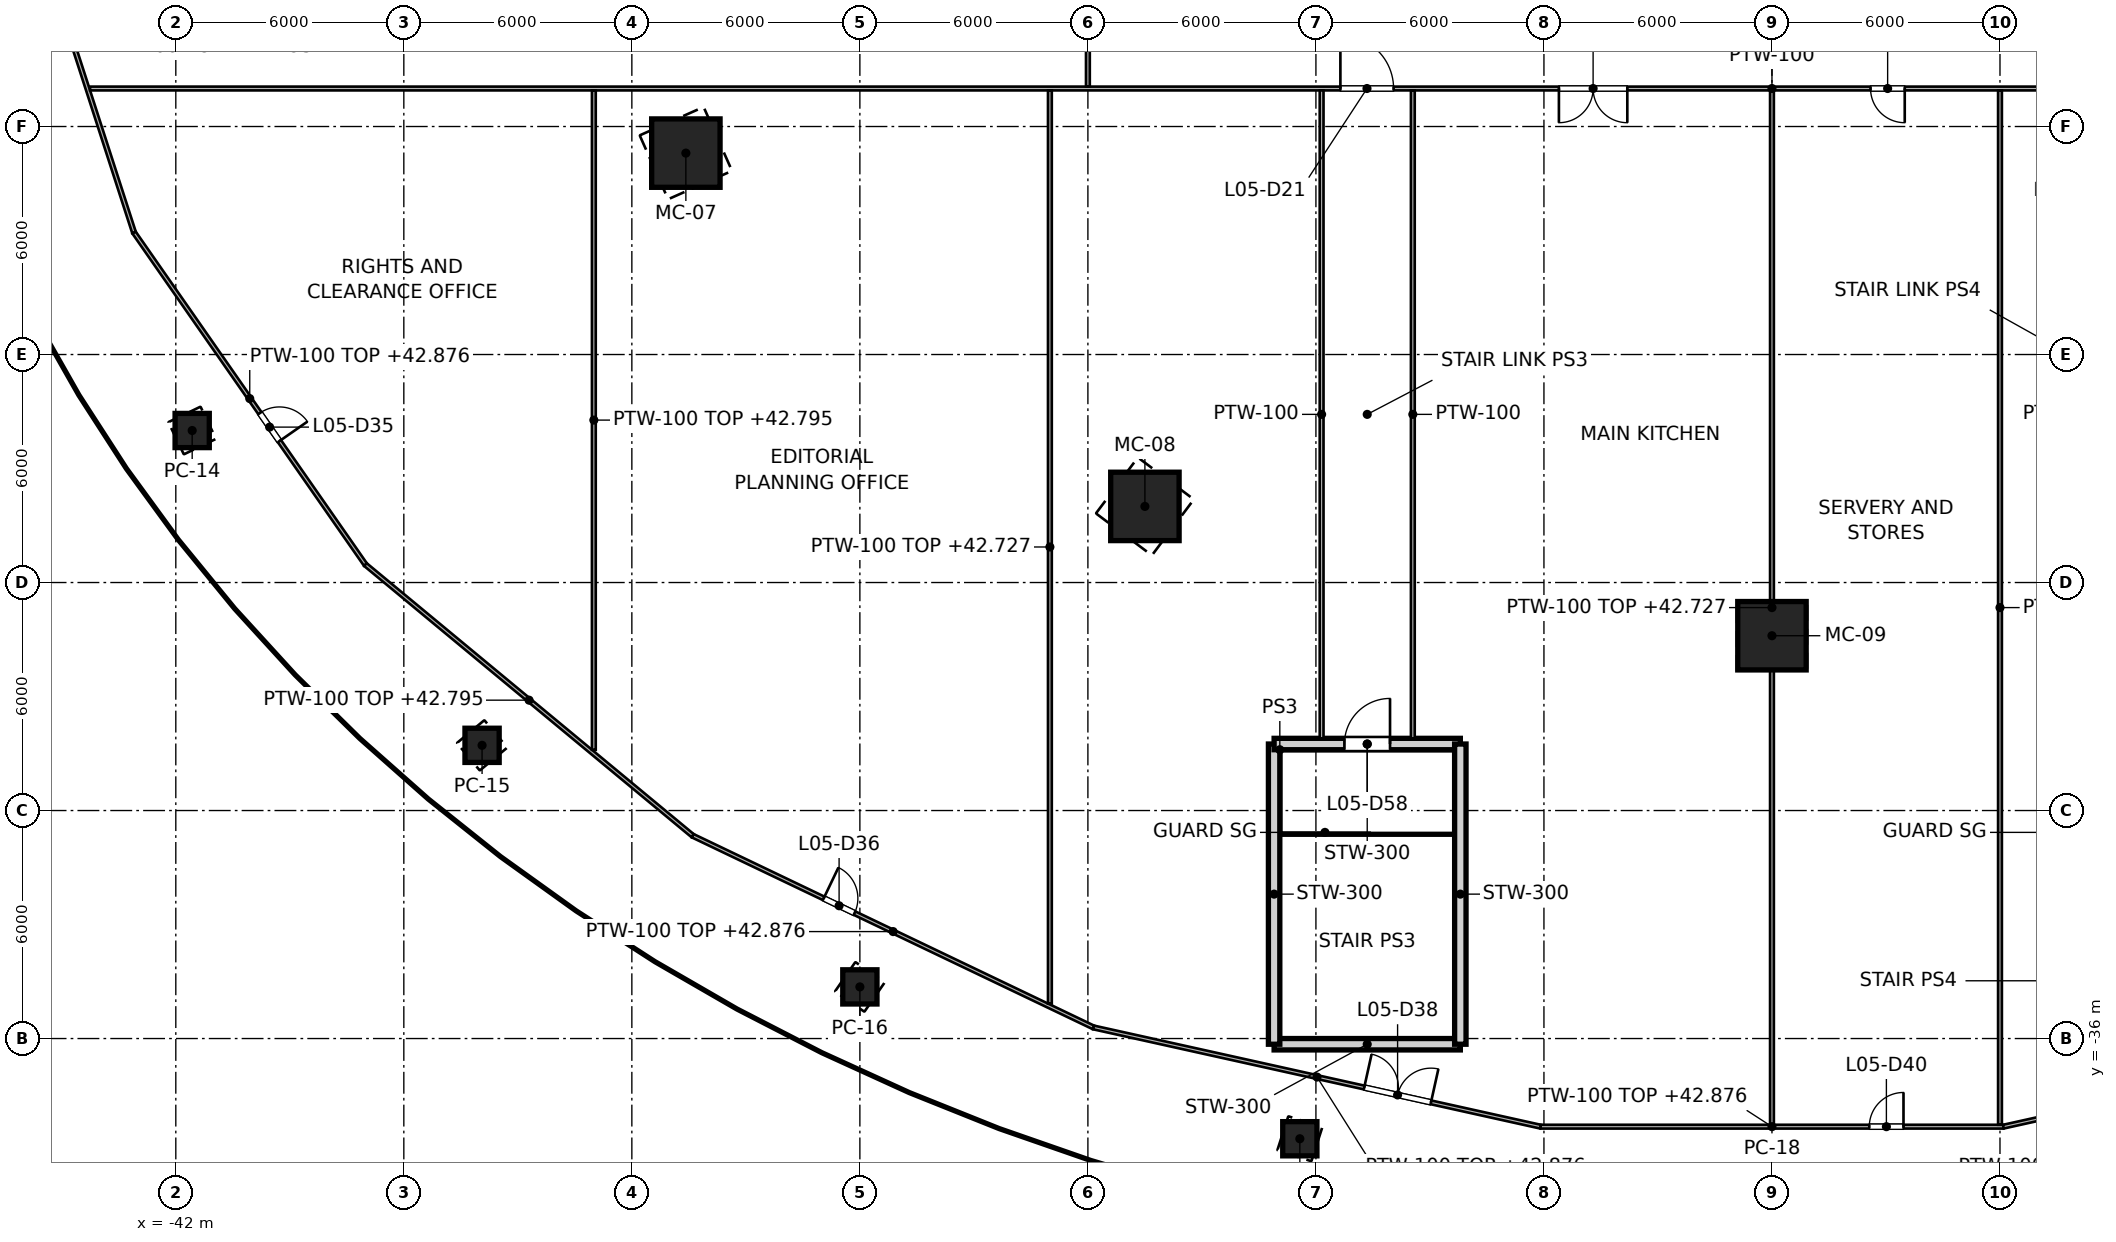
"""IFC4 building model, lengths in metres.
Left out: names, types, materials, properties, quantities, classifications, styles, units other than length and angle.
Written with IfcOpenShell. Run it as: python <this file> out.ifc"""

import sys

from ifc_helpers import new_model, si_unit, direction, frame, frame_2d, origin, origin_2d, place, context, subcontext, project, spatial, rectangle, hollow_rectangle, extrude, element, fill, save


model = new_model("IFC4")
c1 = context("Model", 3, precision=1e-05, world=origin(), true_north=direction((0.0, 1.0)))
c2 = subcontext(c1, "Body", "Model", "MODEL_VIEW")
j1 = project(units=[si_unit("LENGTHUNIT", "METRE"), si_unit("PLANEANGLEUNIT", "RADIAN")], contexts=[c1])
p1 = place(None, origin())
s1 = spatial("IfcSite", under=j1, at=p1, CompositionType="ELEMENT")
p2 = place(p1, origin())
s2 = spatial("IfcBuilding", under=s1, at=p2, CompositionType="ELEMENT")
p3 = place(p2, frame((0.0, 0.0, 37.4)))
s3 = spatial("IfcBuildingStorey", under=s2, at=p3, CompositionType="ELEMENT", Elevation=37.4)
for number, where, z_axis, x_axis in (
    (1, (-28.579, -12.7, 0.0), (0.0, 0.0, 1.0), (-0.914, -0.406, 0.0)),
    (2, (-16.5, -21.997, 0.0), (0.0, 0.0, 1.0), (-0.6, -0.8, 0.0)),
    (3, (0.0, -25.4, 0.0), (0.0, 0.0, 1.0), (0.0, -1.0, 0.0)),
):
    element("IfcColumn", number, at=place(p3, frame(where, z_axis=z_axis, x_axis=x_axis)), inside=s3, PredefinedType="COLUMN", context=c2, shape_type="SweptSolid", body=[
        extrude(hollow_rectangle(XDim=1.8, YDim=1.8, WallThickness=0.08, at=origin_2d()), origin(), (0.0, 0.0, 1.0), 5.9),
    ])
for number, where, z_axis, x_axis in (
    (4, (-41.569, -20.0, 0.0), (0.0, 0.0, 1.0), (-0.901, -0.434, 0.0)),
    (5, (-33.941, -28.284, 0.0), (0.0, 0.0, 1.0), (-0.768, -0.64, 0.0)),
    (6, (-24.0, -34.641, 0.0), (0.0, 0.0, 1.0), (-0.569, -0.822, 0.0)),
    (7, (-12.423, -38.637, 0.0), (0.0, 0.0, 1.0), (-0.306, -0.952, 0.0)),
):
    element("IfcColumn", number, at=place(p3, frame(where, z_axis=z_axis, x_axis=x_axis)), inside=s3, PredefinedType="COLUMN", context=c2, shape_type="SweptSolid", body=[
        extrude(hollow_rectangle(XDim=0.9, YDim=0.9, WallThickness=0.04, at=origin_2d()), origin(), (0.0, 0.0, 1.0), 6.6),
    ])
p4 = place(p3, frame((-8.2, -36.15, 0.0), z_axis=(0.0, 0.0, 1.0), x_axis=(-1.0, 0.0, 0.0)))
e8 = element("IfcWall", 8, at=p4, inside=s3, PredefinedType="SOLIDWALL", context=c2, shape_type="SweptSolid", body=[
    extrude(rectangle(XDim=4.9, YDim=0.3, at=frame_2d((2.45, 0.0))), origin(), (0.0, 0.0, 1.0), 6.25),
])
p5 = place(p3, frame((-13.1, -36.15, 0.0), z_axis=(0.0, 0.0, 1.0), x_axis=(0.0, 1.0, 0.0)))
e9 = element("IfcWall", 9, at=p5, inside=s3, PredefinedType="SOLIDWALL", context=c2, shape_type="SweptSolid", body=[
    extrude(rectangle(XDim=7.9, YDim=0.3, at=frame_2d((3.95, 0.0))), origin(), (0.0, 0.0, 1.0), 6.25),
])
p6 = place(p3, frame((-13.1, -28.25, 0.0), z_axis=(0.0, 0.0, 1.0), x_axis=(1.0, 0.0, 0.0)))
e10 = element("IfcWall", 10, at=p6, inside=s3, PredefinedType="SOLIDWALL", context=c2, shape_type="SweptSolid", body=[
    extrude(rectangle(XDim=4.9, YDim=0.3, at=frame_2d((2.45, 0.0))), origin(), (0.0, 0.0, 1.0), 6.25),
])
p7 = place(p6, frame((1.85, 0.0, 0.0)))
e11 = element("IfcOpeningElement", 11, at=p7, cuts=e10, PredefinedType="OPENING", context=c2, shape_type="SweptSolid", body=[
    extrude(rectangle(XDim=1.2, YDim=2.1, at=frame_2d((0.6, 1.05))), frame((0.0, 0.15, 0.0), z_axis=(0.0, -1.0, 0.0), x_axis=(1.0, 0.0, 0.0)), (0.0, 0.0, 1.0), 0.3),
])
p8 = place(p3, frame((-8.2, -28.25, 0.0), z_axis=(0.0, 0.0, 1.0), x_axis=(0.0, -1.0, 0.0)))
e12 = element("IfcWall", 12, at=p8, inside=s3, PredefinedType="SOLIDWALL", context=c2, shape_type="SweptSolid", body=[
    extrude(rectangle(XDim=7.9, YDim=0.3, at=frame_2d((3.95, 0.0))), origin(), (0.0, 0.0, 1.0), 6.25),
])
p9 = place(p3, frame((-46.251, -5.045, 0.0), z_axis=(0.0, 0.0, 1.0), x_axis=(0.307713034182, -0.951479210805, 0.0)))
e13 = element("IfcWall", 13, at=p9, inside=s3, PredefinedType="PARTITIONING", context=c2, shape_type="SweptSolid", body=[
    extrude(rectangle(XDim=10.243, YDim=0.1, at=frame_2d((5.122, 0.0))), origin(), (0.0, 0.0, 1.0), 5.395),
])
p10 = place(p3, frame((-43.099, -14.791, 0.0), z_axis=(0.0, 0.0, 1.0), x_axis=(0.571737958261, -0.820436290692, 0.0)))
e14 = element("IfcWall", 14, at=p10, inside=s3, PredefinedType="PARTITIONING", context=c2, shape_type="SweptSolid", body=[
    extrude(rectangle(XDim=10.65, YDim=0.1, at=frame_2d((5.325, 0.0))), origin(), (0.0, 0.0, 1.0), 5.476),
])
p11 = place(p10, frame((5.79, 0.0, 0.0)))
e15 = element("IfcOpeningElement", 15, at=p11, cuts=e14, PredefinedType="OPENING", context=c2, shape_type="SweptSolid", body=[
    extrude(rectangle(XDim=0.9, YDim=2.1, at=frame_2d((0.45, 1.05))), frame((0.0, 0.05, 0.0), z_axis=(0.0, -1.0, 0.0), x_axis=(1.0, 0.0, 0.0)), (0.0, 0.0, 1.0), 0.1),
])
p12 = place(p3, frame((-37.01, -23.529, 0.0), z_axis=(0.0, 0.0, 1.0), x_axis=(0.770046995363, -0.637987166746, 0.0)))
e16 = element("IfcWall", 16, at=p12, inside=s3, PredefinedType="PARTITIONING", context=c2, shape_type="SweptSolid", body=[
    extrude(rectangle(XDim=11.183, YDim=0.1, at=frame_2d((5.591, 0.0))), origin(), (0.0, 0.0, 1.0), 5.395),
])
p13 = place(p3, frame((-28.399, -30.663, 0.0), z_axis=(0.0, 0.0, 1.0), x_axis=(0.902100999032, -0.431524955878, 0.0)))
e17 = element("IfcWall", 17, at=p13, inside=s3, PredefinedType="PARTITIONING", context=c2, shape_type="SweptSolid", body=[
    extrude(rectangle(XDim=11.691, YDim=0.1, at=frame_2d((5.845, 0.0))), origin(), (0.0, 0.0, 1.0), 5.476),
])
p14 = place(p13, frame((3.82, 0.0, 0.0)))
e18 = element("IfcOpeningElement", 18, at=p14, cuts=e17, PredefinedType="OPENING", context=c2, shape_type="SweptSolid", body=[
    extrude(rectangle(XDim=0.9, YDim=2.1, at=frame_2d((0.45, 1.05))), frame((0.0, 0.05, 0.0), z_axis=(0.0, -1.0, 0.0), x_axis=(1.0, 0.0, 0.0)), (0.0, 0.0, 1.0), 0.1),
])
p15 = place(p3, frame((-17.852, -35.708, 0.0), z_axis=(0.0, 0.0, 1.0), x_axis=(0.97623471049, -0.216715920124, 0.0)))
e19 = element("IfcWall", 19, at=p15, inside=s3, PredefinedType="PARTITIONING", context=c2, shape_type="SweptSolid", body=[
    extrude(rectangle(XDim=12.05, YDim=0.1, at=frame_2d((6.025, 0.0))), origin(), (0.0, 0.0, 1.0), 5.476),
])
p16 = place(p15, frame((7.296, 0.0, 0.0)))
e20 = element("IfcOpeningElement", 20, at=p16, cuts=e19, PredefinedType="OPENING", context=c2, shape_type="SweptSolid", body=[
    extrude(rectangle(XDim=1.8, YDim=2.1, at=frame_2d((0.9, 1.05))), frame((0.0, 0.05, 0.0), z_axis=(0.0, -1.0, 0.0), x_axis=(1.0, 0.0, 0.0)), (0.0, 0.0, 1.0), 0.1),
])
p17 = place(p3, frame((-6.089, -38.319, 0.0), z_axis=(0.0, 0.0, 1.0), x_axis=(1.0, 0.0, 0.0)))
e21 = element("IfcWall", 21, at=p17, inside=s3, PredefinedType="PARTITIONING", context=c2, shape_type="SweptSolid", body=[
    extrude(rectangle(XDim=12.178, YDim=0.1, at=frame_2d((6.089, 0.0))), origin(), (0.0, 0.0, 1.0), 5.476),
])
p18 = place(p17, frame((8.65, 0.0, 0.0)))
e22 = element("IfcOpeningElement", 22, at=p18, cuts=e21, PredefinedType="OPENING", context=c2, shape_type="SweptSolid", body=[
    extrude(rectangle(XDim=0.9, YDim=2.1, at=frame_2d((0.45, 1.05))), frame((0.0, 0.05, 0.0), z_axis=(0.0, -1.0, 0.0), x_axis=(1.0, 0.0, 0.0)), (0.0, 0.0, 1.0), 0.1),
])
p19 = place(p3, frame((6.089, -38.319, 0.0), z_axis=(0.0, 0.0, 1.0), x_axis=(0.97623471049, 0.216715920124, 0.0)))
e23 = element("IfcWall", 23, at=p19, inside=s3, PredefinedType="PARTITIONING", context=c2, shape_type="SweptSolid", body=[
    extrude(rectangle(XDim=12.05, YDim=0.1, at=frame_2d((6.025, 0.0))), origin(), (0.0, 0.0, 1.0), 5.476),
])
p20 = place(p19, frame((3.0, 0.0, 0.0)))
e24 = element("IfcOpeningElement", 24, at=p20, cuts=e23, PredefinedType="OPENING", context=c2, shape_type="SweptSolid", body=[
    extrude(rectangle(XDim=1.8, YDim=2.1, at=frame_2d((0.9, 1.05))), frame((0.0, 0.05, 0.0), z_axis=(0.0, -1.0, 0.0), x_axis=(1.0, 0.0, 0.0)), (0.0, 0.0, 1.0), 0.1),
])
p21 = place(p3, frame((-44.256, -11.0, 0.0), z_axis=(0.0, 0.0, 1.0), x_axis=(1.0, 0.0, 0.0)))
e25 = element("IfcWall", 25, at=p21, inside=s3, PredefinedType="PARTITIONING", context=c2, shape_type="SweptSolid", body=[
    extrude(rectangle(XDim=88.512, YDim=0.1, at=frame_2d((44.256, 0.0))), origin(), (0.0, 0.0, 1.0), 5.318),
])
p22 = place(p21, frame((32.9, 0.0, 0.0)))
e26 = element("IfcOpeningElement", 26, at=p22, cuts=e25, PredefinedType="OPENING", context=c2, shape_type="SweptSolid", body=[
    extrude(rectangle(XDim=1.4, YDim=2.1, at=frame_2d((0.7, 1.05))), frame((0.0, 0.05, 0.0), z_axis=(0.0, -1.0, 0.0), x_axis=(1.0, 0.0, 0.0)), (0.0, 0.0, 1.0), 0.1),
])
p23 = place(p21, frame((54.2, 0.0, 0.0)))
e27 = element("IfcOpeningElement", 27, at=p23, cuts=e25, PredefinedType="OPENING", context=c2, shape_type="SweptSolid", body=[
    extrude(rectangle(XDim=1.4, YDim=2.1, at=frame_2d((0.7, 1.05))), frame((0.0, 0.05, 0.0), z_axis=(0.0, -1.0, 0.0), x_axis=(1.0, 0.0, 0.0)), (0.0, 0.0, 1.0), 0.1),
])
p24 = place(p21, frame((38.65, 0.0, 0.0)))
e28 = element("IfcOpeningElement", 28, at=p24, cuts=e25, PredefinedType="OPENING", context=c2, shape_type="SweptSolid", body=[
    extrude(rectangle(XDim=1.8, YDim=2.1, at=frame_2d((0.9, 1.05))), frame((0.0, 0.05, 0.0), z_axis=(0.0, -1.0, 0.0), x_axis=(1.0, 0.0, 0.0)), (0.0, 0.0, 1.0), 0.1),
])
p25 = place(p21, frame((46.85, 0.0, 0.0)))
e29 = element("IfcOpeningElement", 29, at=p25, cuts=e25, PredefinedType="OPENING", context=c2, shape_type="SweptSolid", body=[
    extrude(rectangle(XDim=0.9, YDim=2.1, at=frame_2d((0.45, 1.05))), frame((0.0, 0.05, 0.0), z_axis=(0.0, -1.0, 0.0), x_axis=(1.0, 0.0, 0.0)), (0.0, 0.0, 1.0), 0.1),
])
p26 = place(p21, frame((57.05, 0.0, 0.0)))
e30 = element("IfcOpeningElement", 30, at=p26, cuts=e25, PredefinedType="OPENING", context=c2, shape_type="SweptSolid", body=[
    extrude(rectangle(XDim=1.8, YDim=2.1, at=frame_2d((0.9, 1.05))), frame((0.0, 0.05, 0.0), z_axis=(0.0, -1.0, 0.0), x_axis=(1.0, 0.0, 0.0)), (0.0, 0.0, 1.0), 0.1),
])
p27 = place(p21, frame((60.6, 0.0, 0.0)))
e31 = element("IfcOpeningElement", 31, at=p27, cuts=e25, PredefinedType="OPENING", context=c2, shape_type="SweptSolid", body=[
    extrude(rectangle(XDim=0.9, YDim=2.1, at=frame_2d((0.45, 1.05))), frame((0.0, 0.05, 0.0), z_axis=(0.0, -1.0, 0.0), x_axis=(1.0, 0.0, 0.0)), (0.0, 0.0, 1.0), 0.1),
])
p28 = place(p3, frame((-18.0, -10.95, 0.0), z_axis=(0.0, 0.0, 1.0), x_axis=(0.0, 1.0, 0.0)))
e32 = element("IfcWall", 32, at=p28, inside=s3, PredefinedType="PARTITIONING", context=c2, shape_type="SweptSolid", body=[
    extrude(rectangle(XDim=21.9, YDim=0.1, at=frame_2d((10.95, 0.0))), origin(), (0.0, 0.0, 1.0), 5.318),
])
p29 = place(p28, frame((19.75, 0.0, 0.0)))
e33 = element("IfcOpeningElement", 33, at=p29, cuts=e32, PredefinedType="OPENING", context=c2, shape_type="SweptSolid", body=[
    extrude(rectangle(XDim=0.9, YDim=2.1, at=frame_2d((0.45, 1.05))), frame((0.0, 0.05, 0.0), z_axis=(0.0, -1.0, 0.0), x_axis=(1.0, 0.0, 0.0)), (0.0, 0.0, 1.0), 0.1),
])
p30 = place(p28, frame((5.85, 0.0, 0.0)))
e34 = element("IfcOpeningElement", 34, at=p30, cuts=e32, PredefinedType="OPENING", context=c2, shape_type="SweptSolid", body=[
    extrude(rectangle(XDim=0.9, YDim=2.1, at=frame_2d((0.45, 1.05))), frame((0.0, 0.05, 0.0), z_axis=(0.0, -1.0, 0.0), x_axis=(1.0, 0.0, 0.0)), (0.0, 0.0, 1.0), 0.1),
])
p31 = place(p28, frame((10.45, 0.0, 0.0)))
e35 = element("IfcOpeningElement", 35, at=p31, cuts=e32, PredefinedType="OPENING", context=c2, shape_type="SweptSolid", body=[
    extrude(rectangle(XDim=0.9, YDim=2.1, at=frame_2d((0.45, 1.05))), frame((0.0, 0.05, 0.0), z_axis=(0.0, -1.0, 0.0), x_axis=(1.0, 0.0, 0.0)), (0.0, 0.0, 1.0), 0.1),
])
p32 = place(p28, frame((15.05, 0.0, 0.0)))
e36 = element("IfcOpeningElement", 36, at=p32, cuts=e32, PredefinedType="OPENING", context=c2, shape_type="SweptSolid", body=[
    extrude(rectangle(XDim=0.9, YDim=2.1, at=frame_2d((0.45, 1.05))), frame((0.0, 0.05, 0.0), z_axis=(0.0, -1.0, 0.0), x_axis=(1.0, 0.0, 0.0)), (0.0, 0.0, 1.0), 0.1),
])
p33 = place(p3, frame((-31.0, -11.05, 0.0), z_axis=(0.0, 0.0, 1.0), x_axis=(0.0, -1.0, 0.0)))
e37 = element("IfcWall", 37, at=p33, inside=s3, PredefinedType="PARTITIONING", context=c2, shape_type="SweptSolid", body=[
    extrude(rectangle(XDim=17.352, YDim=0.1, at=frame_2d((8.676, 0.0))), origin(), (0.0, 0.0, 1.0), 5.395),
])
p34 = place(p3, frame((-19.0, -11.05, 0.0), z_axis=(0.0, 0.0, 1.0), x_axis=(0.0, -1.0, 0.0)))
e38 = element("IfcWall", 38, at=p34, inside=s3, PredefinedType="PARTITIONING", context=c2, shape_type="SweptSolid", body=[
    extrude(rectangle(XDim=24.03, YDim=0.1, at=frame_2d((12.015, 0.0))), origin(), (0.0, 0.0, 1.0), 5.327),
])
p35 = place(p3, frame((0.0, -11.05, 0.0), z_axis=(0.0, 0.0, 1.0), x_axis=(0.0, -1.0, 0.0)))
e39 = element("IfcWall", 39, at=p35, inside=s3, PredefinedType="PARTITIONING", context=c2, shape_type="SweptSolid", body=[
    extrude(rectangle(XDim=27.219, YDim=0.1, at=frame_2d((13.61, 0.0))), origin(), (0.0, 0.0, 1.0), 5.327),
])
p36 = place(p3, frame((6.0, -11.05, 0.0), z_axis=(0.0, 0.0, 1.0), x_axis=(0.0, -1.0, 0.0)))
e40 = element("IfcWall", 40, at=p36, inside=s3, PredefinedType="PARTITIONING", context=c2, shape_type="SweptSolid", body=[
    extrude(rectangle(XDim=27.219, YDim=0.1, at=frame_2d((13.61, 0.0))), origin(), (0.0, 0.0, 1.0), 5.318),
])
for number, where, z_axis, x_axis in (
    (41, (-11.85, -11.05, 0.0), (0.0, 0.0, 1.0), (0.0, -1.0, 0.0)),
    (42, (-9.45, -11.05, 0.0), (0.0, 0.0, 1.0), (0.0, -1.0, 0.0)),
):
    element("IfcWall", number, at=place(p3, frame(where, z_axis=z_axis, x_axis=x_axis)), inside=s3, PredefinedType="PARTITIONING", context=c2, shape_type="SweptSolid", body=[
        extrude(rectangle(XDim=17.05, YDim=0.1, at=frame_2d((8.525, 0.0))), origin(), (0.0, 0.0, 1.0), 5.318),
    ])
p37 = place(p22, origin())
e43 = element("IfcDoor", 43, at=p37, inside=s3, OperationType="SINGLE_SWING_LEFT", PredefinedType="DOOR", context=c2, shape_type="SweptSolid", body=[
    extrude(rectangle(XDim=1.4, YDim=2.1, at=frame_2d((0.7, 1.05))), frame((0.0, 0.025, 0.0), z_axis=(0.0, -1.0, 0.0), x_axis=(1.0, 0.0, 0.0)), (0.0, 0.0, 1.0), 0.05),
])
fill(e26, e43)
p38 = place(p11, origin())
e44 = element("IfcDoor", 44, at=p38, inside=s3, OperationType="SINGLE_SWING_RIGHT", PredefinedType="DOOR", context=c2, shape_type="SweptSolid", body=[
    extrude(rectangle(XDim=0.9, YDim=2.1, at=frame_2d((0.45, 1.05))), frame((0.0, 0.025, 0.0), z_axis=(0.0, -1.0, 0.0), x_axis=(1.0, 0.0, 0.0)), (0.0, 0.0, 1.0), 0.05),
])
fill(e15, e44)
p39 = place(p14, origin())
e45 = element("IfcDoor", 45, at=p39, inside=s3, OperationType="SINGLE_SWING_LEFT", PredefinedType="DOOR", context=c2, shape_type="SweptSolid", body=[
    extrude(rectangle(XDim=0.9, YDim=2.1, at=frame_2d((0.45, 1.05))), frame((0.0, 0.025, 0.0), z_axis=(0.0, -1.0, 0.0), x_axis=(1.0, 0.0, 0.0)), (0.0, 0.0, 1.0), 0.05),
])
fill(e18, e45)
p40 = place(p24, origin())
e46 = element("IfcDoor", 46, at=p40, inside=s3, OperationType="DOUBLE_DOOR_SINGLE_SWING", PredefinedType="DOOR", context=c2, shape_type="SweptSolid", body=[
    extrude(rectangle(XDim=1.8, YDim=2.1, at=frame_2d((0.9, 1.05))), frame((0.0, 0.025, 0.0), z_axis=(0.0, -1.0, 0.0), x_axis=(1.0, 0.0, 0.0)), (0.0, 0.0, 1.0), 0.05),
])
fill(e28, e46)
p41 = place(p16, origin())
e47 = element("IfcDoor", 47, at=p41, inside=s3, OperationType="DOUBLE_DOOR_SINGLE_SWING", PredefinedType="DOOR", context=c2, shape_type="SweptSolid", body=[
    extrude(rectangle(XDim=1.8, YDim=2.1, at=frame_2d((0.9, 1.05))), frame((0.0, 0.025, 0.0), z_axis=(0.0, -1.0, 0.0), x_axis=(1.0, 0.0, 0.0)), (0.0, 0.0, 1.0), 0.05),
])
fill(e20, e47)
p42 = place(p25, origin())
e48 = element("IfcDoor", 48, at=p42, inside=s3, OperationType="SINGLE_SWING_RIGHT", PredefinedType="DOOR", context=c2, shape_type="SweptSolid", body=[
    extrude(rectangle(XDim=0.9, YDim=2.1, at=frame_2d((0.45, 1.05))), frame((0.0, 0.025, 0.0), z_axis=(0.0, -1.0, 0.0), x_axis=(1.0, 0.0, 0.0)), (0.0, 0.0, 1.0), 0.05),
])
fill(e29, e48)
p43 = place(p18, origin())
e49 = element("IfcDoor", 49, at=p43, inside=s3, OperationType="SINGLE_SWING_RIGHT", PredefinedType="DOOR", context=c2, shape_type="SweptSolid", body=[
    extrude(rectangle(XDim=0.9, YDim=2.1, at=frame_2d((0.45, 1.05))), frame((0.0, 0.025, 0.0), z_axis=(0.0, -1.0, 0.0), x_axis=(1.0, 0.0, 0.0)), (0.0, 0.0, 1.0), 0.05),
])
fill(e22, e49)
p44 = place(p7, origin())
e50 = element("IfcDoor", 50, at=p44, inside=s3, OperationType="SINGLE_SWING_RIGHT", PredefinedType="DOOR", context=c2, shape_type="SweptSolid", body=[
    extrude(rectangle(XDim=1.2, YDim=2.1, at=frame_2d((0.6, 1.05))), frame((0.0, 0.025, 0.0), z_axis=(0.0, -1.0, 0.0), x_axis=(1.0, 0.0, 0.0)), (0.0, 0.0, 1.0), 0.05),
])
fill(e11, e50)
save(model, sys.argv[1])
